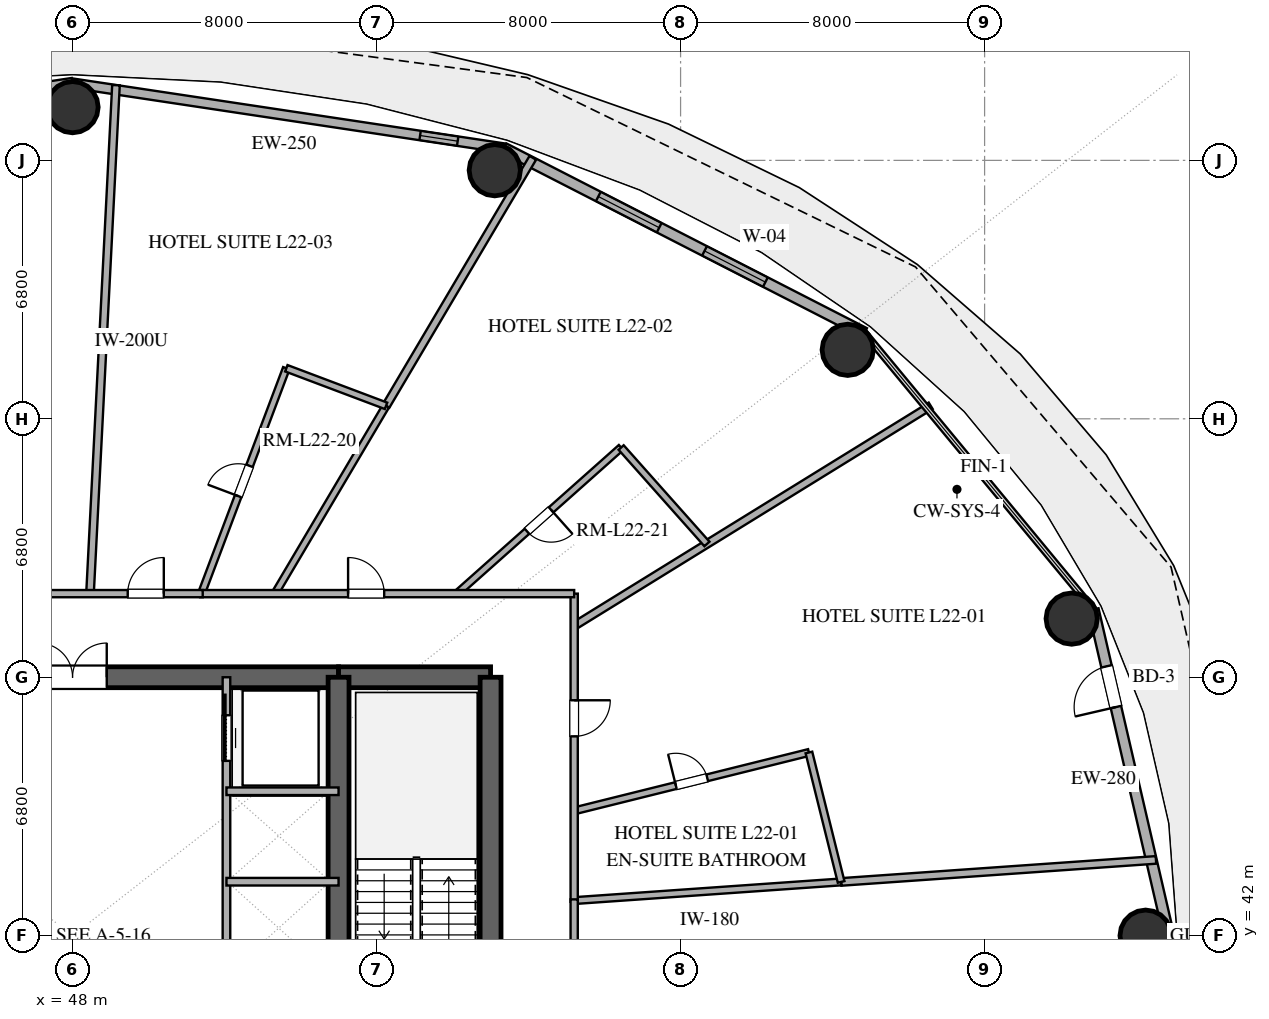
"""IFC4 building model, lengths in metres.
Left out: names, types, materials, properties, quantities, classifications, styles, units other than length and angle.
Written with IfcOpenShell. Run it as: python <this file> out.ifc"""

import sys

from ifc_helpers import new_model, si_unit, direction, frame, frame_2d, origin, origin_2d, place, context, subcontext, project, spatial, rectangle, hollow_circle, extrude, element, fill, save


model = new_model("IFC4")
c1 = context("Model", 3, precision=1e-05, world=origin(), true_north=direction((0.0, 1.0)))
c2 = subcontext(c1, "Body", "Model", "MODEL_VIEW")
j1 = project(units=[si_unit("LENGTHUNIT", "METRE"), si_unit("PLANEANGLEUNIT", "RADIAN")], contexts=[c1])
p1 = place(None, origin())
s1 = spatial("IfcSite", under=j1, at=p1, CompositionType="ELEMENT")
p2 = place(p1, origin())
s2 = spatial("IfcBuilding", under=s1, at=p2, CompositionType="ELEMENT")
p3 = place(p2, frame((0.0, 0.0, 91.2)))
s3 = spatial("IfcBuildingStorey", under=s2, at=p3, CompositionType="ELEMENT", Elevation=91.2)
p4 = place(p3, frame((41.0, 48.8, 0.0), z_axis=(0.0, 0.0, 1.0), x_axis=(1.0, 0.0, 0.0)))
e1 = element("IfcWall", 1, at=p4, inside=s3, PredefinedType="SHEAR", context=c2, shape_type="SweptSolid", body=[
    extrude(rectangle(XDim=14.0, YDim=0.55, at=frame_2d((7.0, 0.0))), origin(), (0.0, 0.0, 1.0), 3.38),
])
p5 = place(p4, frame((6.1, 0.0, 0.0)))
e2 = element("IfcOpeningElement", 2, at=p5, cuts=e1, PredefinedType="OPENING", context=c2, shape_type="SweptSolid", body=[
    extrude(rectangle(XDim=1.8, YDim=2.25, at=frame_2d((0.9, 1.125))), frame((0.0, 0.285, 0.0), z_axis=(0.0, -1.0, 0.0), x_axis=(1.0, 0.0, 0.0)), (0.0, 0.0, 1.0), 0.57),
])
p6 = place(p3, frame((55.0, 48.8, 0.0), z_axis=(0.0, 0.0, 1.0), x_axis=(1.0, 0.0, 0.0)))
e3 = element("IfcWall", 3, at=p6, inside=s3, PredefinedType="SHEAR", context=c2, shape_type="SweptSolid", body=[
    extrude(rectangle(XDim=4.0, YDim=0.55, at=frame_2d((2.0, 0.0))), origin(), (0.0, 0.0, 1.0), 3.38),
])
p7 = place(p3, frame((59.0, 35.2, 0.0), z_axis=(0.0, 0.0, 1.0), x_axis=(0.0, 1.0, 0.0)))
e4 = element("IfcWall", 4, at=p7, inside=s3, PredefinedType="SHEAR", context=c2, shape_type="SweptSolid", body=[
    extrude(rectangle(XDim=13.6, YDim=0.55, at=frame_2d((6.8, 0.0))), origin(), (0.0, 0.0, 1.0), 3.38),
])
p8 = place(p7, frame((1.5, 0.0, 0.0)))
e5 = element("IfcOpeningElement", 5, at=p8, cuts=e4, PredefinedType="OPENING", context=c2, shape_type="SweptSolid", body=[
    extrude(rectangle(XDim=1.2, YDim=2.15, at=frame_2d((0.6, 1.075))), frame((0.0, 0.285, 0.0), z_axis=(0.0, -1.0, 0.0), x_axis=(1.0, 0.0, 0.0)), (0.0, 0.0, 1.0), 0.57),
])
p9 = place(p3, frame((55.0, 35.2, 0.0), z_axis=(0.0, 0.0, 1.0), x_axis=(0.0, 1.0, 0.0)))
e6 = element("IfcWall", 6, at=p9, inside=s3, PredefinedType="SHEAR", context=c2, shape_type="SweptSolid", body=[
    extrude(rectangle(XDim=13.6, YDim=0.55, at=frame_2d((6.8, 0.0))), origin(), (0.0, 0.0, 1.0), 3.38),
])
p10 = place(p9, frame((1.15, 0.0, 0.0)))
e7 = element("IfcOpeningElement", 7, at=p10, cuts=e6, PredefinedType="OPENING", context=c2, shape_type="SweptSolid", body=[
    extrude(rectangle(XDim=1.1, YDim=2.2, at=frame_2d((0.55, 1.1))), frame((0.0, 0.285, 0.0), z_axis=(0.0, -1.0, 0.0), x_axis=(1.0, 0.0, 0.0)), (0.0, 0.0, 1.0), 0.57),
])
for number, where, z_axis, x_axis in (
    (8, (76.237, 42.0, 0.0), (0.0, 0.0, 1.0), (1.0, 0.0, 0.0)),
    (9, (74.291, 50.343, 0.0), (0.0, 0.0, 1.0), (1.0, 0.0, 0.0)),
    (10, (68.398, 57.415, 0.0), (0.0, 0.0, 1.0), (1.0, 0.0, 0.0)),
    (11, (59.11, 62.141, 0.0), (0.0, 0.0, 1.0), (1.0, 0.0, 0.0)),
    (12, (48.0, 63.8, 0.0), (0.0, 0.0, 1.0), (1.0, 0.0, 0.0)),
):
    element("IfcColumn", number, at=place(p3, frame(where, z_axis=z_axis, x_axis=x_axis)), inside=s3, PredefinedType="COLUMN", context=c2, shape_type="SweptSolid", body=[
        extrude(hollow_circle(Radius=0.675, WallThickness=0.036, at=origin_2d()), origin(), (0.0, 0.0, 1.0), 3.38),
    ])
p11 = place(p3, frame((76.849, 42.0, 0.0), z_axis=(0.0, 0.0, 1.0), x_axis=(-0.22558597182, 0.974223264616, 0.0)))
e13 = element("IfcWall", 13, at=p11, inside=s3, PredefinedType="SOLIDWALL", context=c2, shape_type="SweptSolid", body=[
    extrude(rectangle(XDim=8.811, YDim=0.28, at=frame_2d((4.405, 0.0))), origin(), (0.0, 0.0, 1.0), 3.38),
])
p12 = place(p11, frame((6.175, 0.0, 0.0)))
e14 = element("IfcOpeningElement", 14, at=p12, cuts=e13, PredefinedType="OPENING", context=c2, shape_type="SweptSolid", body=[
    extrude(rectangle(XDim=1.1, YDim=2.25, at=frame_2d((0.55, 1.125))), frame((0.0, 0.15, 0.0), z_axis=(0.0, -1.0, 0.0), x_axis=(1.0, 0.0, 0.0)), (0.0, 0.0, 1.0), 0.3),
])
p13 = place(p3, frame((68.84, 57.86, 0.0), z_axis=(0.0, 0.0, 1.0), x_axis=(-0.889959505023, 0.45603955905, 0.0)))
e15 = element("IfcWall", 15, at=p13, inside=s3, PredefinedType="SOLIDWALL", context=c2, shape_type="SweptSolid", body=[
    extrude(rectangle(XDim=10.662, YDim=0.28, at=frame_2d((5.331, 0.0))), origin(), (0.0, 0.0, 1.0), 3.38),
])
p14 = place(p13, frame((2.931, 0.0, 0.85)))
e16 = element("IfcOpeningElement", 16, at=p14, cuts=e15, PredefinedType="OPENING", context=c2, shape_type="SweptSolid", body=[
    extrude(rectangle(XDim=1.8, YDim=2.2, at=frame_2d((0.9, 1.1))), frame((0.0, 0.15, 0.0), z_axis=(0.0, -1.0, 0.0), x_axis=(1.0, 0.0, 0.0)), (0.0, 0.0, 1.0), 0.3),
])
p15 = place(p13, frame((6.071, 0.0, 0.85)))
e17 = element("IfcOpeningElement", 17, at=p15, cuts=e15, PredefinedType="OPENING", context=c2, shape_type="SweptSolid", body=[
    extrude(rectangle(XDim=1.8, YDim=2.2, at=frame_2d((0.9, 1.1))), frame((0.0, 0.15, 0.0), z_axis=(0.0, -1.0, 0.0), x_axis=(1.0, 0.0, 0.0)), (0.0, 0.0, 1.0), 0.3),
])
p16 = place(p3, frame((59.351, 62.723, 0.0), z_axis=(0.0, 0.0, 1.0), x_axis=(-0.988877774656, 0.148730450117, 0.0)))
e18 = element("IfcWall", 18, at=p16, inside=s3, PredefinedType="SOLIDWALL", context=c2, shape_type="SweptSolid", body=[
    extrude(rectangle(XDim=11.479, YDim=0.25, at=frame_2d((5.74, 0.0))), origin(), (0.0, 0.0, 1.0), 3.38),
])
p17 = place(p16, frame((1.231, 0.0, 1.42)))
e19 = element("IfcOpeningElement", 19, at=p17, cuts=e18, PredefinedType="OPENING", context=c2, shape_type="SweptSolid", body=[
    extrude(rectangle(XDim=1.0, YDim=1.05, at=frame_2d((0.5, 0.525))), frame((0.0, 0.135, 0.0), z_axis=(0.0, -1.0, 0.0), x_axis=(1.0, 0.0, 0.0)), (0.0, 0.0, 1.0), 0.27),
])
p18 = place(p3, frame((48.0, 64.43, 0.0), z_axis=(0.0, 0.0, 1.0), x_axis=(-0.988877774656, -0.148730450117, 0.0)))
e20 = element("IfcWall", 20, at=p18, inside=s3, PredefinedType="SOLIDWALL", context=c2, shape_type="SweptSolid", body=[
    extrude(rectangle(XDim=11.479, YDim=0.28, at=frame_2d((5.74, 0.0))), origin(), (0.0, 0.0, 1.0), 3.38),
])
p19 = place(p18, frame((1.524, 0.0, 0.0)))
e21 = element("IfcOpeningElement", 21, at=p19, cuts=e20, PredefinedType="OPENING", context=c2, shape_type="SweptSolid", body=[
    extrude(rectangle(XDim=1.05, YDim=2.2, at=frame_2d((0.525, 1.1))), frame((0.0, 0.15, 0.0), z_axis=(0.0, -1.0, 0.0), x_axis=(1.0, 0.0, 0.0)), (0.0, 0.0, 1.0), 0.3),
])
p20 = place(p3, frame((74.861, 33.417, 0.0), z_axis=(0.0, 0.0, 1.0), x_axis=(0.22558597182, 0.974223264616, 0.0)))
e22 = element("IfcWall", 22, at=p20, inside=s3, PredefinedType="SOLIDWALL", context=c2, shape_type="SweptSolid", body=[
    extrude(rectangle(XDim=8.811, YDim=0.25, at=frame_2d((4.405, 0.0))), origin(), (0.0, 0.0, 1.0), 3.38),
])
p21 = place(p3, frame((52.05, 38.4, 0.0), z_axis=(0.0, 0.0, 1.0), x_axis=(0.0, 1.0, 0.0)))
e23 = element("IfcWall", 23, at=p21, inside=s3, PredefinedType="SOLIDWALL", context=c2, shape_type="SweptSolid", body=[
    extrude(rectangle(XDim=10.4, YDim=0.2, at=frame_2d((5.2, 0.0))), origin(), (0.0, 0.0, 1.0), 2.74),
])
p22 = place(p21, frame((8.2, 0.0, 0.0)))
e24 = element("IfcOpeningElement", 24, at=p22, cuts=e23, PredefinedType="OPENING", context=c2, shape_type="SweptSolid", body=[
    extrude(rectangle(XDim=1.2, YDim=2.2, at=frame_2d((0.6, 1.1))), frame((0.0, 0.11, 0.0), z_axis=(0.0, -1.0, 0.0), x_axis=(1.0, 0.0, 0.0)), (0.0, 0.0, 1.0), 0.22),
])
for number, where, z_axis, x_axis in (
    (25, (52.05, 43.42, 0.0), (0.0, 0.0, 1.0), (1.0, 0.0, 0.0)),
    (26, (52.05, 45.8, 0.0), (0.0, 0.0, 1.0), (1.0, 0.0, 0.0)),
):
    element("IfcWall", number, at=place(p3, frame(where, z_axis=z_axis, x_axis=x_axis)), inside=s3, PredefinedType="SOLIDWALL", context=c2, shape_type="SweptSolid", body=[
        extrude(rectangle(XDim=2.95, YDim=0.2, at=frame_2d((1.475, 0.0))), origin(), (0.0, 0.0, 1.0), 2.74),
    ])
p23 = place(p3, frame((49.143, 64.379, 0.0), z_axis=(0.0, 0.0, 1.0), x_axis=(-0.050973793346, -0.998699991185, 0.0)))
e27 = element("IfcWall", 27, at=p23, inside=s3, PredefinedType="PARTITIONING", context=c2, shape_type="SweptSolid", body=[
    extrude(rectangle(XDim=13.396, YDim=0.2, at=frame_2d((6.698, 0.0))), origin(), (0.0, 0.0, 1.0), 2.74),
])
p24 = place(p3, frame((76.509, 43.994, 0.0), z_axis=(0.0, 0.0, 1.0), x_axis=(-0.997563838401, -0.069759503404, 0.0)))
e28 = element("IfcWall", 28, at=p24, inside=s3, PredefinedType="PARTITIONING", context=c2, shape_type="SweptSolid", body=[
    extrude(rectangle(XDim=8.305, YDim=0.2, at=frame_2d((4.152, 0.0))), origin(), (0.0, 0.0, 1.0), 2.74),
])
p25 = place(p3, frame((60.112, 62.468, 0.0), z_axis=(0.0, 0.0, 1.0), x_axis=(-0.509263960295, -0.860610375689, 0.0)))
e29 = element("IfcWall", 29, at=p25, inside=s3, PredefinedType="PARTITIONING", context=c2, shape_type="SweptSolid", body=[
    extrude(rectangle(XDim=7.583, YDim=0.2, at=frame_2d((3.792, 0.0))), origin(), (0.0, 0.0, 1.0), 2.74),
])
p26 = place(p3, frame((68.224, 43.414, 0.0), z_axis=(0.0, 0.0, 1.0), x_axis=(-0.997563891584, -0.06975874287, 0.0)))
e30 = element("IfcWall", 30, at=p26, inside=s3, PredefinedType="PLUMBINGWALL", context=c2, shape_type="SweptSolid", body=[
    extrude(rectangle(XDim=7.042, YDim=0.18, at=frame_2d((3.521, 0.0))), origin(), (0.0, 0.0, 1.0), 2.74),
])
p27 = place(p3, frame((61.2, 50.15, 0.0), z_axis=(0.0, 0.0, 1.0), x_axis=(0.850874276333, 0.525369361377, 0.0)))
e31 = element("IfcWall", 31, at=p27, inside=s3, PredefinedType="PARTITIONING", context=c2, shape_type="SweptSolid", body=[
    extrude(rectangle(XDim=11.026, YDim=0.2, at=frame_2d((5.513, 0.0))), origin(), (0.0, 0.0, 1.0), 2.74),
])
p28 = place(p3, frame((61.2, 45.284, 0.0), z_axis=(0.0, 0.0, 1.0), x_axis=(0.970426102609, 0.241398383125, 0.0)))
e32 = element("IfcWall", 32, at=p28, inside=s3, PredefinedType="PLUMBINGWALL", context=c2, shape_type="SweptSolid", body=[
    extrude(rectangle(XDim=6.365, YDim=0.18, at=frame_2d((3.183, 0.0))), origin(), (0.0, 0.0, 1.0), 2.74),
])
p29 = place(p28, frame((2.758, 0.0, 0.0)))
e33 = element("IfcOpeningElement", 33, at=p29, cuts=e32, PredefinedType="OPENING", context=c2, shape_type="SweptSolid", body=[
    extrude(rectangle(XDim=0.85, YDim=2.1, at=frame_2d((0.425, 1.05))), frame((0.0, 0.1, 0.0), z_axis=(0.0, -1.0, 0.0), x_axis=(1.0, 0.0, 0.0)), (0.0, 0.0, 1.0), 0.2),
])
p30 = place(p3, frame((51.391, 51.0, 0.0), z_axis=(0.0, 0.0, 1.0), x_axis=(0.352583810303, 0.935780239539, 0.0)))
e34 = element("IfcWall", 34, at=p30, inside=s3, PredefinedType="PLUMBINGWALL", context=c2, shape_type="SweptSolid", body=[
    extrude(rectangle(XDim=6.337, YDim=0.18, at=frame_2d((3.168, 0.0))), origin(), (0.0, 0.0, 1.0), 2.74),
])
p31 = place(p30, frame((2.744, 0.0, 0.0)))
e35 = element("IfcOpeningElement", 35, at=p31, cuts=e34, PredefinedType="OPENING", context=c2, shape_type="SweptSolid", body=[
    extrude(rectangle(XDim=0.85, YDim=2.1, at=frame_2d((0.425, 1.05))), frame((0.0, 0.1, 0.0), z_axis=(0.0, -1.0, 0.0), x_axis=(1.0, 0.0, 0.0)), (0.0, 0.0, 1.0), 0.2),
])
p32 = place(p3, frame((62.436, 54.844, 0.0), z_axis=(0.0, 0.0, 1.0), x_axis=(-0.747085499985, -0.664727956168, 0.0)))
e36 = element("IfcWall", 36, at=p32, inside=s3, PredefinedType="PLUMBINGWALL", context=c2, shape_type="SweptSolid", body=[
    extrude(rectangle(XDim=5.783, YDim=0.18, at=frame_2d((2.892, 0.0))), origin(), (0.0, 0.0, 1.0), 2.74),
])
p33 = place(p32, frame((2.467, 0.0, 0.0)))
e37 = element("IfcOpeningElement", 37, at=p33, cuts=e36, PredefinedType="OPENING", context=c2, shape_type="SweptSolid", body=[
    extrude(rectangle(XDim=0.85, YDim=2.1, at=frame_2d((0.425, 1.05))), frame((0.0, 0.1, 0.0), z_axis=(0.0, -1.0, 0.0), x_axis=(1.0, 0.0, 0.0)), (0.0, 0.0, 1.0), 0.2),
])
p34 = place(p3, frame((56.25, 55.941, 0.0), z_axis=(0.0, 0.0, 1.0), x_axis=(-0.509296473297, -0.860591135376, 0.0)))
e38 = element("IfcWall", 38, at=p34, inside=s3, PredefinedType="PLUMBINGWALL", context=c2, shape_type="SweptSolid", body=[
    extrude(rectangle(XDim=5.742, YDim=0.18, at=frame_2d((2.871, 0.0))), origin(), (0.0, 0.0, 1.0), 2.74),
])
p35 = place(p3, frame((61.2, 51.0, 0.0), z_axis=(0.0, 0.0, 1.0), x_axis=(0.0, -1.0, 0.0)))
e39 = element("IfcWall", 39, at=p35, inside=s3, PredefinedType="PARTITIONING", context=c2, shape_type="SweptSolid", body=[
    extrude(rectangle(XDim=8.109, YDim=0.19, at=frame_2d((4.055, 0.0))), origin(), (0.0, 0.0, 1.0), 2.74),
])
p36 = place(p35, frame((2.806, 0.0, 0.0)))
e40 = element("IfcOpeningElement", 40, at=p36, cuts=e39, PredefinedType="OPENING", context=c2, shape_type="SweptSolid", body=[
    extrude(rectangle(XDim=0.95, YDim=2.15, at=frame_2d((0.475, 1.075))), frame((0.0, 0.105, 0.0), z_axis=(0.0, -1.0, 0.0), x_axis=(1.0, 0.0, 0.0)), (0.0, 0.0, 1.0), 0.21),
])
p37 = place(p3, frame((51.357, 51.0, 0.0), z_axis=(0.0, 0.0, 1.0), x_axis=(1.0, 0.0, 0.0)))
e41 = element("IfcWall", 41, at=p37, inside=s3, PredefinedType="PARTITIONING", context=c2, shape_type="SweptSolid", body=[
    extrude(rectangle(XDim=9.843, YDim=0.19, at=frame_2d((4.921, 0.0))), origin(), (0.0, 0.0, 1.0), 2.74),
])
p38 = place(p37, frame((3.894, 0.0, 0.0)))
e42 = element("IfcOpeningElement", 42, at=p38, cuts=e41, PredefinedType="OPENING", context=c2, shape_type="SweptSolid", body=[
    extrude(rectangle(XDim=0.95, YDim=2.15, at=frame_2d((0.475, 1.075))), frame((0.0, 0.105, 0.0), z_axis=(0.0, -1.0, 0.0), x_axis=(1.0, 0.0, 0.0)), (0.0, 0.0, 1.0), 0.21),
])
p39 = place(p3, frame((43.812, 51.0, 0.0), z_axis=(0.0, 0.0, 1.0), x_axis=(1.0, 0.0, 0.0)))
e43 = element("IfcWall", 43, at=p39, inside=s3, PredefinedType="PARTITIONING", context=c2, shape_type="SweptSolid", body=[
    extrude(rectangle(XDim=7.613, YDim=0.19, at=frame_2d((3.807, 0.0))), origin(), (0.0, 0.0, 1.0), 2.74),
])
p40 = place(p39, frame((1.84, 0.0, 0.0)))
e44 = element("IfcOpeningElement", 44, at=p40, cuts=e43, PredefinedType="OPENING", context=c2, shape_type="SweptSolid", body=[
    extrude(rectangle(XDim=1.0, YDim=2.2, at=frame_2d((0.5, 1.1))), frame((0.0, 0.105, 0.0), z_axis=(0.0, -1.0, 0.0), x_axis=(1.0, 0.0, 0.0)), (0.0, 0.0, 1.0), 0.21),
])
p41 = place(p39, frame((5.639, 0.0, 0.0)))
e45 = element("IfcOpeningElement", 45, at=p41, cuts=e43, PredefinedType="OPENING", context=c2, shape_type="SweptSolid", body=[
    extrude(rectangle(XDim=0.95, YDim=2.15, at=frame_2d((0.475, 1.075))), frame((0.0, 0.105, 0.0), z_axis=(0.0, -1.0, 0.0), x_axis=(1.0, 0.0, 0.0)), (0.0, 0.0, 1.0), 0.21),
])
p42 = place(p3, frame((61.2, 42.955, 0.0), z_axis=(0.0, 0.0, 1.0), x_axis=(0.0, -1.0, 0.0)))
e46 = element("IfcWall", 46, at=p42, inside=s3, PredefinedType="PARTITIONING", context=c2, shape_type="SweptSolid", body=[
    extrude(rectangle(XDim=6.782, YDim=0.19, at=frame_2d((3.391, 0.0))), origin(), (0.0, 0.0, 1.0), 2.74),
])
p43 = place(p42, frame((1.631, 0.0, 0.0)))
e47 = element("IfcOpeningElement", 47, at=p43, cuts=e46, PredefinedType="OPENING", context=c2, shape_type="SweptSolid", body=[
    extrude(rectangle(XDim=0.95, YDim=2.15, at=frame_2d((0.475, 1.075))), frame((0.0, 0.105, 0.0), z_axis=(0.0, -1.0, 0.0), x_axis=(1.0, 0.0, 0.0)), (0.0, 0.0, 1.0), 0.21),
])
p44 = place(p3, frame((67.377, 46.82, 0.0), z_axis=(0.0, 0.0, 1.0), x_axis=(0.241373388957, -0.970432319692, 0.0)))
e48 = element("IfcWall", 48, at=p44, inside=s3, PredefinedType="PLUMBINGWALL", context=c2, shape_type="SweptSolid", body=[
    extrude(rectangle(XDim=3.51, YDim=0.18, at=frame_2d((1.755, 0.0))), origin(), (0.0, 0.0, 1.0), 2.74),
])
p45 = place(p3, frame((64.694, 52.307, 0.0), z_axis=(0.0, 0.0, 1.0), x_axis=(-0.664720670732, 0.747091982222, 0.0)))
e49 = element("IfcWall", 49, at=p45, inside=s3, PredefinedType="PLUMBINGWALL", context=c2, shape_type="SweptSolid", body=[
    extrude(rectangle(XDim=3.397, YDim=0.18, at=frame_2d((1.698, 0.0))), origin(), (0.0, 0.0, 1.0), 2.74),
])
p46 = place(p3, frame((53.625, 56.93, 0.0), z_axis=(0.0, 0.0, 1.0), x_axis=(0.93579147225, -0.352553996522, 0.0)))
e50 = element("IfcWall", 50, at=p46, inside=s3, PredefinedType="PLUMBINGWALL", context=c2, shape_type="SweptSolid", body=[
    extrude(rectangle(XDim=2.805, YDim=0.18, at=frame_2d((1.402, 0.0))), origin(), (0.0, 0.0, 1.0), 2.74),
])
p47 = place(p12, origin())
e51 = element("IfcDoor", 51, at=p47, inside=s3, OperationType="SINGLE_SWING_LEFT", PredefinedType="DOOR", context=c2, shape_type="SweptSolid", body=[
    extrude(rectangle(XDim=1.1, YDim=2.25, at=frame_2d((0.55, 1.125))), frame((0.0, 0.025, 0.0), z_axis=(0.0, -1.0, 0.0), x_axis=(1.0, 0.0, 0.0)), (0.0, 0.0, 1.0), 0.05),
])
fill(e14, e51)
p48 = place(p14, origin())
e52 = element("IfcWindow", 52, at=p48, inside=s3, PartitioningType="SINGLE_PANEL", PredefinedType="WINDOW", context=c2, shape_type="SweptSolid", body=[
    extrude(rectangle(XDim=1.8, YDim=2.2, at=frame_2d((0.9, 1.1))), frame((0.0, 0.03, 0.0), z_axis=(0.0, -1.0, 0.0), x_axis=(1.0, 0.0, 0.0)), (0.0, 0.0, 1.0), 0.06),
])
fill(e16, e52)
p49 = place(p15, origin())
e53 = element("IfcWindow", 53, at=p49, inside=s3, PartitioningType="SINGLE_PANEL", PredefinedType="WINDOW", context=c2, shape_type="SweptSolid", body=[
    extrude(rectangle(XDim=1.8, YDim=2.2, at=frame_2d((0.9, 1.1))), frame((0.0, 0.03, 0.0), z_axis=(0.0, -1.0, 0.0), x_axis=(1.0, 0.0, 0.0)), (0.0, 0.0, 1.0), 0.06),
])
fill(e17, e53)
p50 = place(p17, origin())
e54 = element("IfcWindow", 54, at=p50, inside=s3, PartitioningType="SINGLE_PANEL", PredefinedType="WINDOW", context=c2, shape_type="SweptSolid", body=[
    extrude(rectangle(XDim=1.0, YDim=1.05, at=frame_2d((0.5, 0.525))), frame((0.0, 0.03, 0.0), z_axis=(0.0, -1.0, 0.0), x_axis=(1.0, 0.0, 0.0)), (0.0, 0.0, 1.0), 0.06),
])
fill(e19, e54)
p51 = place(p5, origin())
e55 = element("IfcDoor", 55, at=p51, inside=s3, OperationType="DOUBLE_DOOR_SINGLE_SWING", PredefinedType="DOOR", context=c2, shape_type="SweptSolid", body=[
    extrude(rectangle(XDim=1.8, YDim=2.25, at=frame_2d((0.9, 1.125))), frame((0.0, 0.025, 0.0), z_axis=(0.0, -1.0, 0.0), x_axis=(1.0, 0.0, 0.0)), (0.0, 0.0, 1.0), 0.05),
])
fill(e2, e55)
p52 = place(p22, origin())
e56 = element("IfcDoor", 56, at=p52, inside=s3, OperationType="SLIDING_TO_RIGHT", PredefinedType="DOOR", context=c2, shape_type="SweptSolid", body=[
    extrude(rectangle(XDim=1.2, YDim=2.2, at=frame_2d((0.6, 1.1))), frame((0.0, 0.025, 0.0), z_axis=(0.0, -1.0, 0.0), x_axis=(1.0, 0.0, 0.0)), (0.0, 0.0, 1.0), 0.05),
])
fill(e24, e56)
p53 = place(p29, origin())
e57 = element("IfcDoor", 57, at=p53, inside=s3, OperationType="SINGLE_SWING_LEFT", PredefinedType="DOOR", context=c2, shape_type="SweptSolid", body=[
    extrude(rectangle(XDim=0.85, YDim=2.1, at=frame_2d((0.425, 1.05))), frame((0.0, 0.025, 0.0), z_axis=(0.0, -1.0, 0.0), x_axis=(1.0, 0.0, 0.0)), (0.0, 0.0, 1.0), 0.05),
])
fill(e33, e57)
p54 = place(p31, origin())
e58 = element("IfcDoor", 58, at=p54, inside=s3, OperationType="SINGLE_SWING_LEFT", PredefinedType="DOOR", context=c2, shape_type="SweptSolid", body=[
    extrude(rectangle(XDim=0.85, YDim=2.1, at=frame_2d((0.425, 1.05))), frame((0.0, 0.025, 0.0), z_axis=(0.0, -1.0, 0.0), x_axis=(1.0, 0.0, 0.0)), (0.0, 0.0, 1.0), 0.05),
])
fill(e35, e58)
p55 = place(p33, origin())
e59 = element("IfcDoor", 59, at=p55, inside=s3, OperationType="SINGLE_SWING_LEFT", PredefinedType="DOOR", context=c2, shape_type="SweptSolid", body=[
    extrude(rectangle(XDim=0.85, YDim=2.1, at=frame_2d((0.425, 1.05))), frame((0.0, 0.025, 0.0), z_axis=(0.0, -1.0, 0.0), x_axis=(1.0, 0.0, 0.0)), (0.0, 0.0, 1.0), 0.05),
])
fill(e37, e59)
p56 = place(p36, origin())
e60 = element("IfcDoor", 60, at=p56, inside=s3, OperationType="SINGLE_SWING_LEFT", PredefinedType="DOOR", context=c2, shape_type="SweptSolid", body=[
    extrude(rectangle(XDim=0.95, YDim=2.15, at=frame_2d((0.475, 1.075))), frame((0.0, 0.025, 0.0), z_axis=(0.0, -1.0, 0.0), x_axis=(1.0, 0.0, 0.0)), (0.0, 0.0, 1.0), 0.05),
])
fill(e40, e60)
p57 = place(p38, origin())
e61 = element("IfcDoor", 61, at=p57, inside=s3, OperationType="SINGLE_SWING_LEFT", PredefinedType="DOOR", context=c2, shape_type="SweptSolid", body=[
    extrude(rectangle(XDim=0.95, YDim=2.15, at=frame_2d((0.475, 1.075))), frame((0.0, 0.025, 0.0), z_axis=(0.0, -1.0, 0.0), x_axis=(1.0, 0.0, 0.0)), (0.0, 0.0, 1.0), 0.05),
])
fill(e42, e61)
p58 = place(p41, origin())
e62 = element("IfcDoor", 62, at=p58, inside=s3, OperationType="SINGLE_SWING_RIGHT", PredefinedType="DOOR", context=c2, shape_type="SweptSolid", body=[
    extrude(rectangle(XDim=0.95, YDim=2.15, at=frame_2d((0.475, 1.075))), frame((0.0, 0.025, 0.0), z_axis=(0.0, -1.0, 0.0), x_axis=(1.0, 0.0, 0.0)), (0.0, 0.0, 1.0), 0.05),
])
fill(e45, e62)
save(model, sys.argv[1])
